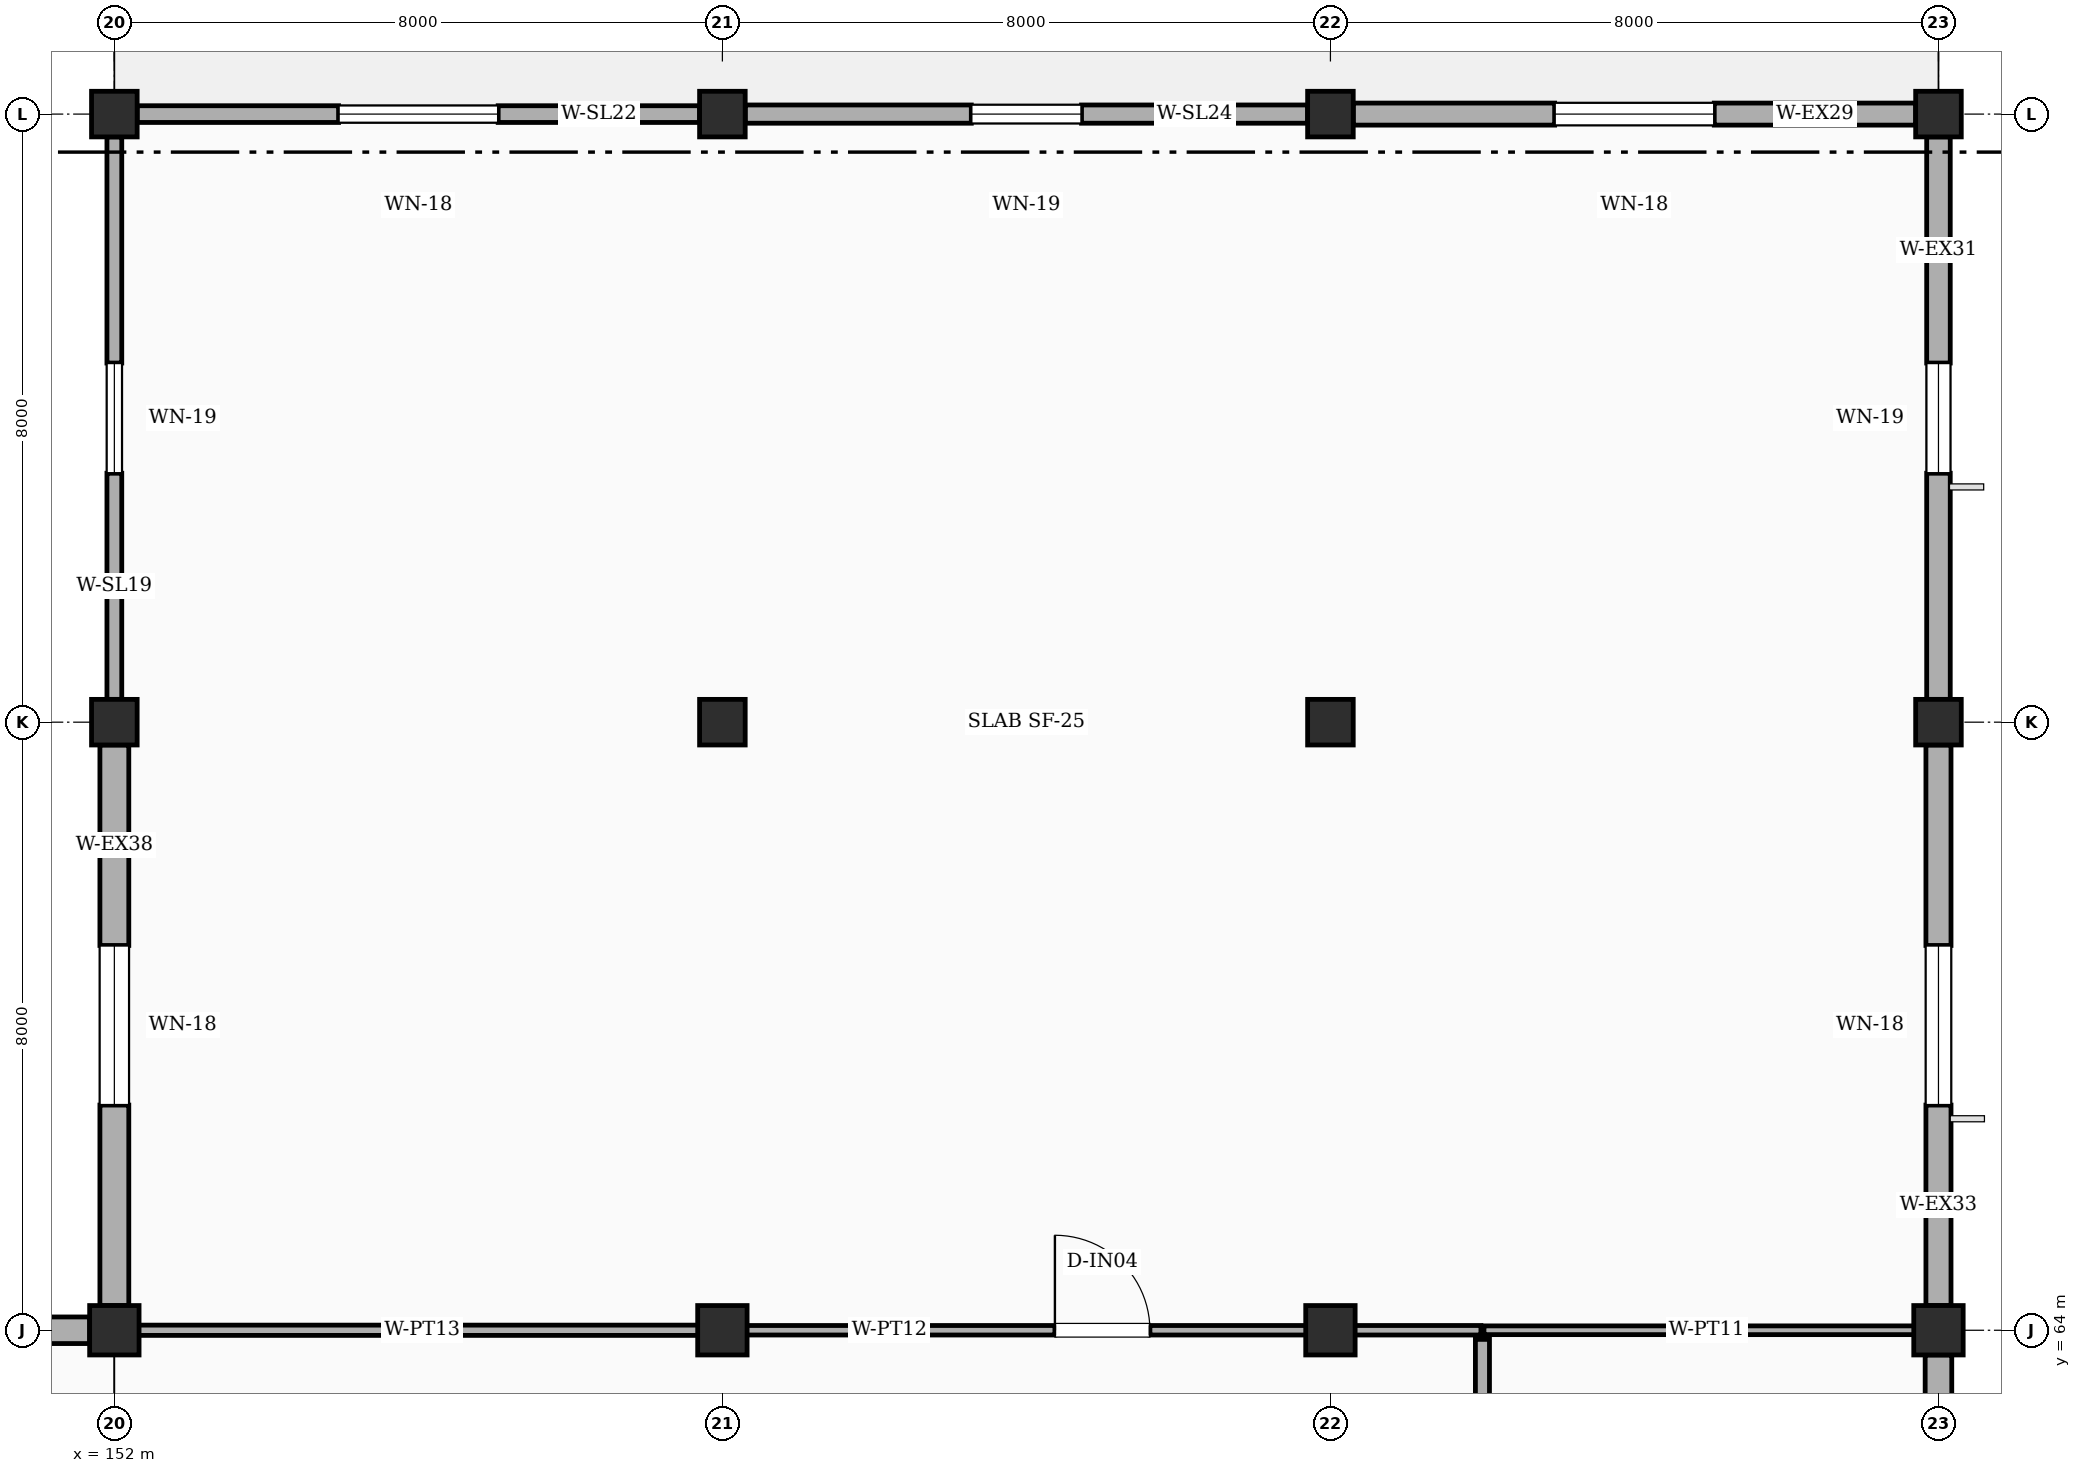
"""IFC4 building model, lengths in metres.
Left out: names, types, materials, properties, quantities, classifications, styles, units other than length and angle.
Written with IfcOpenShell. Run it as: python <this file> out.ifc"""

import sys

from ifc_helpers import new_model, si_unit, direction, frame, frame_2d, origin, origin_2d, place, context, subcontext, project, spatial, rectangle, extrude, element, fill, save


model = new_model("IFC4")
c1 = context("Model", 3, precision=1e-05, world=origin(), true_north=direction((0.0, 1.0)))
c2 = subcontext(c1, "Body", "Model", "MODEL_VIEW")
j1 = project(units=[si_unit("LENGTHUNIT", "METRE"), si_unit("PLANEANGLEUNIT", "RADIAN")], contexts=[c1])
p1 = place(None, origin())
s1 = spatial("IfcSite", under=j1, at=p1, CompositionType="ELEMENT")
p2 = place(p1, origin())
s2 = spatial("IfcBuilding", under=s1, at=p2, CompositionType="ELEMENT")
p3 = place(p2, frame((0.0, 0.0, 15.0)))
s3 = spatial("IfcBuildingStorey", under=s2, at=p3, CompositionType="ELEMENT", Elevation=15.0)
for number, where, z_axis, x_axis in (
    (1, (152.0, 64.0, 0.0), (0.0, 0.0, 1.0), (1.0, 0.0, 0.0)),
    (2, (160.0, 64.0, 0.0), (0.0, 0.0, 1.0), (1.0, 0.0, 0.0)),
    (3, (168.0, 64.0, 0.0), (0.0, 0.0, 1.0), (1.0, 0.0, 0.0)),
    (4, (176.0, 64.0, 0.0), (0.0, 0.0, 1.0), (1.0, 0.0, 0.0)),
):
    element("IfcColumn", number, at=place(p3, frame(where, z_axis=z_axis, x_axis=x_axis)), inside=s3, PredefinedType="COLUMN", context=c2, shape_type="SweptSolid", body=[
        extrude(rectangle(XDim=0.65, YDim=0.65, at=origin_2d()), origin(), (0.0, 0.0, 1.0), 4.2),
    ])
for number, where, z_axis, x_axis in (
    (5, (152.0, 72.0, 0.0), (0.0, 0.0, 1.0), (1.0, 0.0, 0.0)),
    (6, (152.0, 80.0, 0.0), (0.0, 0.0, 1.0), (1.0, 0.0, 0.0)),
    (7, (160.0, 72.0, 0.0), (0.0, 0.0, 1.0), (1.0, 0.0, 0.0)),
    (8, (160.0, 80.0, 0.0), (0.0, 0.0, 1.0), (1.0, 0.0, 0.0)),
    (9, (168.0, 72.0, 0.0), (0.0, 0.0, 1.0), (1.0, 0.0, 0.0)),
    (10, (168.0, 80.0, 0.0), (0.0, 0.0, 1.0), (1.0, 0.0, 0.0)),
    (11, (176.0, 72.0, 0.0), (0.0, 0.0, 1.0), (1.0, 0.0, 0.0)),
    (12, (176.0, 80.0, 0.0), (0.0, 0.0, 1.0), (1.0, 0.0, 0.0)),
):
    element("IfcColumn", number, at=place(p3, frame(where, z_axis=z_axis, x_axis=x_axis)), inside=s3, PredefinedType="COLUMN", context=c2, shape_type="SweptSolid", body=[
        extrude(rectangle(XDim=0.6, YDim=0.6, at=origin_2d()), origin(), (0.0, 0.0, 1.0), 4.2),
    ])
p4 = place(p3, frame((176.0, 56.325, 0.0), z_axis=(0.0, 0.0, 1.0), x_axis=(0.0, 1.0, 0.0)))
e13 = element("IfcWall", 13, at=p4, inside=s3, PredefinedType="STANDARD", context=c2, shape_type="SweptSolid", body=[
    extrude(rectangle(XDim=7.35, YDim=0.35, at=frame_2d((3.675, 0.0))), origin(), (0.0, 0.0, 1.0), 3.34),
])
p5 = place(p4, frame((2.95, 0.0, 1.15)))
e14 = element("IfcOpeningElement", 14, at=p5, cuts=e13, PredefinedType="OPENING", context=c2, shape_type="SweptSolid", body=[
    extrude(rectangle(XDim=1.45, YDim=1.4, at=frame_2d((0.725, 0.7))), frame((0.0, 0.185, 0.0), z_axis=(0.0, -1.0, 0.0), x_axis=(1.0, 0.0, 0.0)), (0.0, 0.0, 1.0), 0.37),
])
p6 = place(p3, frame((176.0, 64.325, 0.0), z_axis=(0.0, 0.0, 1.0), x_axis=(0.0, 1.0, 0.0)))
e15 = element("IfcWall", 15, at=p6, inside=s3, PredefinedType="STANDARD", context=c2, shape_type="SweptSolid", body=[
    extrude(rectangle(XDim=7.375, YDim=0.33, at=frame_2d((3.688, 0.0))), origin(), (0.0, 0.0, 1.0), 3.34),
])
p7 = place(p6, frame((2.637, 0.0, 1.15)))
e16 = element("IfcOpeningElement", 16, at=p7, cuts=e15, PredefinedType="OPENING", context=c2, shape_type="SweptSolid", body=[
    extrude(rectangle(XDim=2.1, YDim=1.4, at=frame_2d((1.05, 0.7))), frame((0.0, 0.175, 0.0), z_axis=(0.0, -1.0, 0.0), x_axis=(1.0, 0.0, 0.0)), (0.0, 0.0, 1.0), 0.35),
])
p8 = place(p3, frame((176.0, 72.3, 0.0), z_axis=(0.0, 0.0, 1.0), x_axis=(0.0, 1.0, 0.0)))
e17 = element("IfcWall", 17, at=p8, inside=s3, PredefinedType="STANDARD", context=c2, shape_type="SweptSolid", body=[
    extrude(rectangle(XDim=7.4, YDim=0.31, at=frame_2d((3.7, 0.0))), origin(), (0.0, 0.0, 1.0), 3.34),
])
p9 = place(p8, frame((2.975, 0.0, 1.15)))
e18 = element("IfcOpeningElement", 18, at=p9, cuts=e17, PredefinedType="OPENING", context=c2, shape_type="SweptSolid", body=[
    extrude(rectangle(XDim=1.45, YDim=1.4, at=frame_2d((0.725, 0.7))), frame((0.0, 0.165, 0.0), z_axis=(0.0, -1.0, 0.0), x_axis=(1.0, 0.0, 0.0)), (0.0, 0.0, 1.0), 0.33),
])
p10 = place(p3, frame((175.7, 80.0, 0.0), z_axis=(0.0, 0.0, 1.0), x_axis=(-1.0, 0.0, 0.0)))
e19 = element("IfcWall", 19, at=p10, inside=s3, PredefinedType="STANDARD", context=c2, shape_type="SweptSolid", body=[
    extrude(rectangle(XDim=7.4, YDim=0.29, at=frame_2d((3.7, 0.0))), origin(), (0.0, 0.0, 1.0), 3.34),
])
p11 = place(p10, frame((2.65, 0.0, 1.15)))
e20 = element("IfcOpeningElement", 20, at=p11, cuts=e19, PredefinedType="OPENING", context=c2, shape_type="SweptSolid", body=[
    extrude(rectangle(XDim=2.1, YDim=1.4, at=frame_2d((1.05, 0.7))), frame((0.0, 0.155, 0.0), z_axis=(0.0, -1.0, 0.0), x_axis=(1.0, 0.0, 0.0)), (0.0, 0.0, 1.0), 0.31),
])
p12 = place(p3, frame((167.7, 80.0, 0.0), z_axis=(0.0, 0.0, 1.0), x_axis=(-1.0, 0.0, 0.0)))
e21 = element("IfcWall", 21, at=p12, inside=s3, PredefinedType="SOLIDWALL", context=c2, shape_type="SweptSolid", body=[
    extrude(rectangle(XDim=7.4, YDim=0.24, at=frame_2d((3.7, 0.0))), origin(), (0.0, 0.0, 1.0), 3.34),
])
p13 = place(p12, frame((2.975, 0.0, 1.15)))
e22 = element("IfcOpeningElement", 22, at=p13, cuts=e21, PredefinedType="OPENING", context=c2, shape_type="SweptSolid", body=[
    extrude(rectangle(XDim=1.45, YDim=1.4, at=frame_2d((0.725, 0.7))), frame((0.0, 0.13, 0.0), z_axis=(0.0, -1.0, 0.0), x_axis=(1.0, 0.0, 0.0)), (0.0, 0.0, 1.0), 0.26),
])
p14 = place(p3, frame((159.7, 80.0, 0.0), z_axis=(0.0, 0.0, 1.0), x_axis=(-1.0, 0.0, 0.0)))
e23 = element("IfcWall", 23, at=p14, inside=s3, PredefinedType="SOLIDWALL", context=c2, shape_type="SweptSolid", body=[
    extrude(rectangle(XDim=7.4, YDim=0.22, at=frame_2d((3.7, 0.0))), origin(), (0.0, 0.0, 1.0), 3.36),
])
p15 = place(p14, frame((2.65, 0.0, 1.15)))
e24 = element("IfcOpeningElement", 24, at=p15, cuts=e23, PredefinedType="OPENING", context=c2, shape_type="SweptSolid", body=[
    extrude(rectangle(XDim=2.1, YDim=1.4, at=frame_2d((1.05, 0.7))), frame((0.0, 0.12, 0.0), z_axis=(0.0, -1.0, 0.0), x_axis=(1.0, 0.0, 0.0)), (0.0, 0.0, 1.0), 0.24),
])
p16 = place(p3, frame((152.0, 79.7, 0.0), z_axis=(0.0, 0.0, 1.0), x_axis=(0.0, -1.0, 0.0)))
e25 = element("IfcWall", 25, at=p16, inside=s3, PredefinedType="SOLIDWALL", context=c2, shape_type="SweptSolid", body=[
    extrude(rectangle(XDim=7.4, YDim=0.195, at=frame_2d((3.7, 0.0))), origin(), (0.0, 0.0, 1.0), 3.36),
])
p17 = place(p16, frame((2.975, 0.0, 1.15)))
e26 = element("IfcOpeningElement", 26, at=p17, cuts=e25, PredefinedType="OPENING", context=c2, shape_type="SweptSolid", body=[
    extrude(rectangle(XDim=1.45, YDim=1.4, at=frame_2d((0.725, 0.7))), frame((0.0, 0.107, 0.0), z_axis=(0.0, -1.0, 0.0), x_axis=(1.0, 0.0, 0.0)), (0.0, 0.0, 1.0), 0.215),
])
p18 = place(p3, frame((152.0, 71.7, 0.0), z_axis=(0.0, 0.0, 1.0), x_axis=(0.0, -1.0, 0.0)))
e27 = element("IfcWall", 27, at=p18, inside=s3, PredefinedType="STANDARD", context=c2, shape_type="SweptSolid", body=[
    extrude(rectangle(XDim=7.375, YDim=0.38, at=frame_2d((3.688, 0.0))), origin(), (0.0, 0.0, 1.0), 3.36),
])
p19 = place(p18, frame((2.637, 0.0, 1.15)))
e28 = element("IfcOpeningElement", 28, at=p19, cuts=e27, PredefinedType="OPENING", context=c2, shape_type="SweptSolid", body=[
    extrude(rectangle(XDim=2.1, YDim=1.4, at=frame_2d((1.05, 0.7))), frame((0.0, 0.2, 0.0), z_axis=(0.0, -1.0, 0.0), x_axis=(1.0, 0.0, 0.0)), (0.0, 0.0, 1.0), 0.4),
])
p20 = place(p3, frame((151.675, 64.0, 0.0), z_axis=(0.0, 0.0, 1.0), x_axis=(-1.0, 0.0, 0.0)))
e29 = element("IfcWall", 29, at=p20, inside=s3, PredefinedType="STANDARD", context=c2, shape_type="SweptSolid", body=[
    extrude(rectangle(XDim=6.975, YDim=0.35, at=frame_2d((3.488, 0.0))), origin(), (0.0, 0.0, 1.0), 3.95),
])
p21 = place(p20, frame((2.762, 0.0, 1.15)))
e30 = element("IfcOpeningElement", 30, at=p21, cuts=e29, PredefinedType="OPENING", context=c2, shape_type="SweptSolid", body=[
    extrude(rectangle(XDim=1.45, YDim=1.4, at=frame_2d((0.725, 0.7))), frame((0.0, 0.185, 0.0), z_axis=(0.0, -1.0, 0.0), x_axis=(1.0, 0.0, 0.0)), (0.0, 0.0, 1.0), 0.37),
])
p22 = place(p3, frame((170.0, 59.02, 0.0), z_axis=(0.0, 0.0, 1.0), x_axis=(0.0, 1.0, 0.0)))
e31 = element("IfcWall", 31, at=p22, inside=s3, PredefinedType="PLUMBINGWALL", context=c2, shape_type="SweptSolid", body=[
    extrude(rectangle(XDim=4.86, YDim=0.185, at=frame_2d((2.43, 0.0))), origin(), (0.0, 0.0, 1.0), 3.31),
])
p23 = place(p22, frame((1.95, 0.0, 0.0)))
e32 = element("IfcOpeningElement", 32, at=p23, cuts=e31, PredefinedType="OPENING", context=c2, shape_type="SweptSolid", body=[
    extrude(rectangle(XDim=0.96, YDim=2.1, at=frame_2d((0.48, 1.05))), frame((0.0, 0.103, 0.0), z_axis=(0.0, -1.0, 0.0), x_axis=(1.0, 0.0, 0.0)), (0.0, 0.0, 1.0), 0.205),
])
p24 = place(p3, frame((152.12, 64.0, 0.0), z_axis=(0.0, 0.0, 1.0), x_axis=(1.0, 0.0, 0.0)))
e33 = element("IfcWall", 33, at=p24, inside=s3, PredefinedType="PARTITIONING", context=c2, shape_type="SweptSolid", body=[
    extrude(rectangle(XDim=7.86, YDim=0.135, at=frame_2d((3.93, 0.0))), origin(), (0.0, 0.0, 1.0), 3.34),
])
p25 = place(p3, frame((160.02, 64.0, 0.0), z_axis=(0.0, 0.0, 1.0), x_axis=(1.0, 0.0, 0.0)))
e34 = element("IfcWall", 34, at=p25, inside=s3, PredefinedType="PARTITIONING", context=c2, shape_type="SweptSolid", body=[
    extrude(rectangle(XDim=9.96, YDim=0.125, at=frame_2d((4.98, 0.0))), origin(), (0.0, 0.0, 1.0), 3.31),
])
p26 = place(p25, frame((4.355, 0.0, 0.0)))
e35 = element("IfcOpeningElement", 35, at=p26, cuts=e34, PredefinedType="OPENING", context=c2, shape_type="SweptSolid", body=[
    extrude(rectangle(XDim=1.25, YDim=2.15, at=frame_2d((0.625, 1.075))), frame((0.0, 0.073, 0.0), z_axis=(0.0, -1.0, 0.0), x_axis=(1.0, 0.0, 0.0)), (0.0, 0.0, 1.0), 0.145),
])
p27 = place(p3, frame((170.02, 64.0, 0.0), z_axis=(0.0, 0.0, 1.0), x_axis=(1.0, 0.0, 0.0)))
e36 = element("IfcWall", 36, at=p27, inside=s3, PredefinedType="PARTITIONING", context=c2, shape_type="SweptSolid", body=[
    extrude(rectangle(XDim=5.86, YDim=0.115, at=frame_2d((2.93, 0.0))), origin(), (0.0, 0.0, 1.0), 3.31),
])
p28 = place(p7, origin())
e37 = element("IfcWindow", 37, at=p28, inside=s3, PartitioningType="SINGLE_PANEL", PredefinedType="WINDOW", context=c2, shape_type="SweptSolid", body=[
    extrude(rectangle(XDim=2.1, YDim=1.4, at=frame_2d((1.05, 0.7))), frame((0.0, 0.03, 0.0), z_axis=(0.0, -1.0, 0.0), x_axis=(1.0, 0.0, 0.0)), (0.0, 0.0, 1.0), 0.06),
])
fill(e16, e37)
p29 = place(p9, origin())
e38 = element("IfcWindow", 38, at=p29, inside=s3, PartitioningType="SINGLE_PANEL", PredefinedType="WINDOW", context=c2, shape_type="SweptSolid", body=[
    extrude(rectangle(XDim=1.45, YDim=1.4, at=frame_2d((0.725, 0.7))), frame((0.0, 0.03, 0.0), z_axis=(0.0, -1.0, 0.0), x_axis=(1.0, 0.0, 0.0)), (0.0, 0.0, 1.0), 0.06),
])
fill(e18, e38)
p30 = place(p11, origin())
e39 = element("IfcWindow", 39, at=p30, inside=s3, PartitioningType="SINGLE_PANEL", PredefinedType="WINDOW", context=c2, shape_type="SweptSolid", body=[
    extrude(rectangle(XDim=2.1, YDim=1.4, at=frame_2d((1.05, 0.7))), frame((0.0, 0.03, 0.0), z_axis=(0.0, -1.0, 0.0), x_axis=(1.0, 0.0, 0.0)), (0.0, 0.0, 1.0), 0.06),
])
fill(e20, e39)
p31 = place(p13, origin())
e40 = element("IfcWindow", 40, at=p31, inside=s3, PartitioningType="SINGLE_PANEL", PredefinedType="WINDOW", context=c2, shape_type="SweptSolid", body=[
    extrude(rectangle(XDim=1.45, YDim=1.4, at=frame_2d((0.725, 0.7))), frame((0.0, 0.03, 0.0), z_axis=(0.0, -1.0, 0.0), x_axis=(1.0, 0.0, 0.0)), (0.0, 0.0, 1.0), 0.06),
])
fill(e22, e40)
p32 = place(p15, origin())
e41 = element("IfcWindow", 41, at=p32, inside=s3, PartitioningType="SINGLE_PANEL", PredefinedType="WINDOW", context=c2, shape_type="SweptSolid", body=[
    extrude(rectangle(XDim=2.1, YDim=1.4, at=frame_2d((1.05, 0.7))), frame((0.0, 0.03, 0.0), z_axis=(0.0, -1.0, 0.0), x_axis=(1.0, 0.0, 0.0)), (0.0, 0.0, 1.0), 0.06),
])
fill(e24, e41)
p33 = place(p17, origin())
e42 = element("IfcWindow", 42, at=p33, inside=s3, PartitioningType="SINGLE_PANEL", PredefinedType="WINDOW", context=c2, shape_type="SweptSolid", body=[
    extrude(rectangle(XDim=1.45, YDim=1.4, at=frame_2d((0.725, 0.7))), frame((0.0, 0.03, 0.0), z_axis=(0.0, -1.0, 0.0), x_axis=(1.0, 0.0, 0.0)), (0.0, 0.0, 1.0), 0.06),
])
fill(e26, e42)
p34 = place(p19, origin())
e43 = element("IfcWindow", 43, at=p34, inside=s3, PartitioningType="SINGLE_PANEL", PredefinedType="WINDOW", context=c2, shape_type="SweptSolid", body=[
    extrude(rectangle(XDim=2.1, YDim=1.4, at=frame_2d((1.05, 0.7))), frame((0.0, 0.03, 0.0), z_axis=(0.0, -1.0, 0.0), x_axis=(1.0, 0.0, 0.0)), (0.0, 0.0, 1.0), 0.06),
])
fill(e28, e43)
p35 = place(p26, origin())
e44 = element("IfcDoor", 44, at=p35, inside=s3, OperationType="SINGLE_SWING_LEFT", PredefinedType="DOOR", context=c2, shape_type="SweptSolid", body=[
    extrude(rectangle(XDim=1.25, YDim=2.15, at=frame_2d((0.625, 1.075))), frame((0.0, 0.025, 0.0), z_axis=(0.0, -1.0, 0.0), x_axis=(1.0, 0.0, 0.0)), (0.0, 0.0, 1.0), 0.05),
])
fill(e35, e44)
save(model, sys.argv[1])
